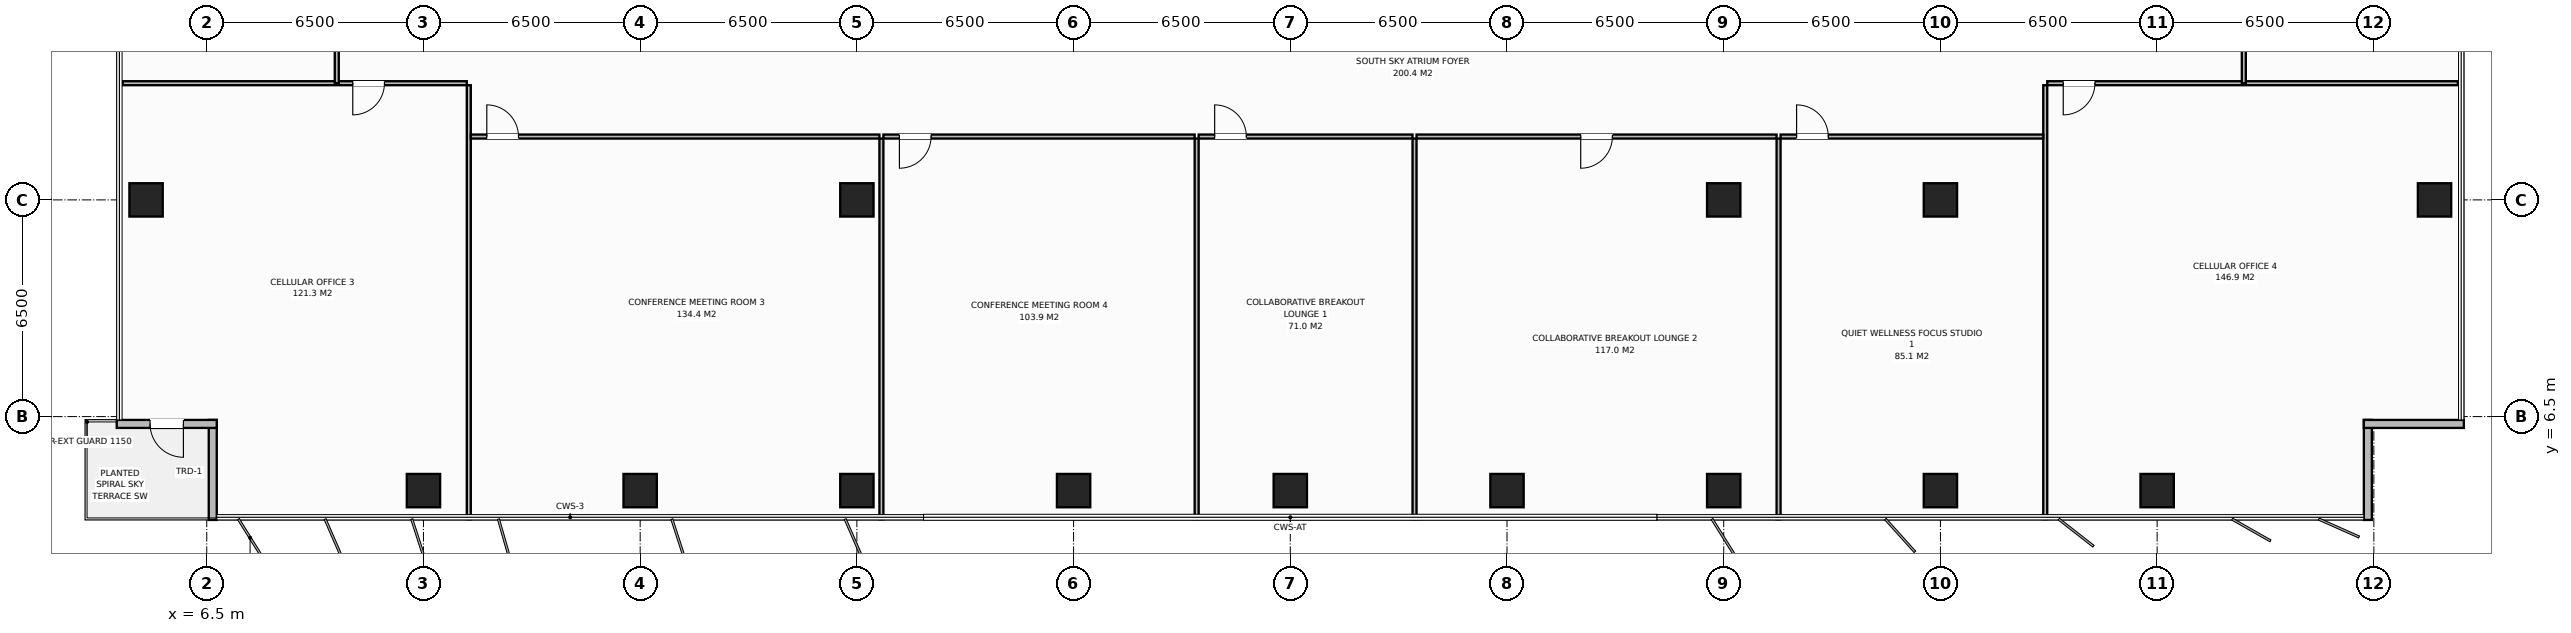
"""IFC4 building model, lengths in metres.
Left out: names, types, materials, properties, quantities, classifications, styles, units other than length and angle.
Written with IfcOpenShell. Run it as: python <this file> out.ifc"""

import sys

from ifc_helpers import new_model, si_unit, direction, frame, frame_2d, origin, origin_2d, place, context, subcontext, project, spatial, rectangle, extrude, element, fill, save


model = new_model("IFC4")
c1 = context("Model", 3, precision=1e-05, world=origin(), true_north=direction((0.0, 1.0)))
c2 = subcontext(c1, "Body", "Model", "MODEL_VIEW")
j1 = project(units=[si_unit("LENGTHUNIT", "METRE"), si_unit("PLANEANGLEUNIT", "RADIAN")], contexts=[c1])
p1 = place(None, origin())
s1 = spatial("IfcSite", under=j1, at=p1, CompositionType="ELEMENT")
p2 = place(p1, origin())
s2 = spatial("IfcBuilding", under=s1, at=p2, CompositionType="ELEMENT")
p3 = place(p2, frame((0.0, 0.0, 163.2)))
s3 = spatial("IfcBuildingStorey", under=s2, at=p3, CompositionType="ELEMENT", Elevation=163.2)
for number, where, z_axis, x_axis in (
    (1, (58.5, 13.0, 0.0), (0.0, 0.0, 1.0), (1.0, 0.0, 0.0)),
    (2, (26.0, 13.0, 0.0), (0.0, 0.0, 1.0), (1.0, 0.0, 0.0)),
    (3, (52.0, 13.0, 0.0), (0.0, 0.0, 1.0), (1.0, 0.0, 0.0)),
    (4, (13.0, 4.28, 0.0), (0.0, 0.0, 1.0), (1.0, 0.0, 0.0)),
    (5, (19.5, 4.28, 0.0), (0.0, 0.0, 1.0), (1.0, 0.0, 0.0)),
    (6, (26.0, 4.28, 0.0), (0.0, 0.0, 1.0), (1.0, 0.0, 0.0)),
    (7, (32.5, 4.28, 0.0), (0.0, 0.0, 1.0), (1.0, 0.0, 0.0)),
    (8, (39.0, 4.28, 0.0), (0.0, 0.0, 1.0), (1.0, 0.0, 0.0)),
    (9, (45.5, 4.28, 0.0), (0.0, 0.0, 1.0), (1.0, 0.0, 0.0)),
    (10, (52.0, 4.28, 0.0), (0.0, 0.0, 1.0), (1.0, 0.0, 0.0)),
    (11, (58.5, 4.28, 0.0), (0.0, 0.0, 1.0), (1.0, 0.0, 0.0)),
    (12, (65.0, 4.28, 0.0), (0.0, 0.0, 1.0), (1.0, 0.0, 0.0)),
    (13, (4.68, 13.0, 0.0), (0.0, 0.0, 1.0), (1.0, 0.0, 0.0)),
    (14, (73.32, 13.0, 0.0), (0.0, 0.0, 1.0), (1.0, 0.0, 0.0)),
):
    element("IfcColumn", number, at=place(p3, frame(where, z_axis=z_axis, x_axis=x_axis)), inside=s3, PredefinedType="COLUMN", context=c2, shape_type="SweptSolid", body=[
        extrude(rectangle(XDim=1.0, YDim=1.0, at=origin_2d()), origin(), (0.0, 0.0, 1.0), 3.8),
    ])
p4 = place(p3, frame((6.68, 3.4, 0.0), z_axis=(0.0, 0.0, 1.0), x_axis=(0.0, 1.0, 0.0)))
e15 = element("IfcWall", 15, at=p4, inside=s3, PredefinedType="STANDARD", context=c2, shape_type="SweptSolid", body=[
    extrude(rectangle(XDim=3.0, YDim=0.24, at=frame_2d((1.5, 0.0))), origin(), (0.0, 0.0, 1.0), 3.572),
])
p5 = place(p3, frame((6.8, 6.28, 0.0), z_axis=(0.0, 0.0, 1.0), x_axis=(-1.0, 0.0, 0.0)))
e16 = element("IfcWall", 16, at=p5, inside=s3, PredefinedType="STANDARD", context=c2, shape_type="SweptSolid", body=[
    extrude(rectangle(XDim=3.0, YDim=0.24, at=frame_2d((1.5, 0.0))), origin(), (0.0, 0.0, 1.0), 3.572),
])
p6 = place(p5, frame((1.0, 0.0, 0.0)))
e17 = element("IfcOpeningElement", 17, at=p6, cuts=e16, PredefinedType="OPENING", context=c2, shape_type="SweptSolid", body=[
    extrude(rectangle(XDim=1.0, YDim=2.2, at=frame_2d((0.5, 1.1))), frame((0.0, 0.13, 0.0), z_axis=(0.0, -1.0, 0.0), x_axis=(1.0, 0.0, 0.0)), (0.0, 0.0, 1.0), 0.26),
])
for number, where, z_axis, x_axis in (
    (18, (71.32, 6.4, 0.0), (0.0, 0.0, 1.0), (0.0, -1.0, 0.0)),
    (19, (74.2, 6.28, 0.0), (0.0, 0.0, 1.0), (-1.0, 0.0, 0.0)),
):
    element("IfcWall", number, at=place(p3, frame(where, z_axis=z_axis, x_axis=x_axis)), inside=s3, PredefinedType="STANDARD", context=c2, shape_type="SweptSolid", body=[
        extrude(rectangle(XDim=3.0, YDim=0.24, at=frame_2d((1.5, 0.0))), origin(), (0.0, 0.0, 1.0), 3.572),
    ])
p7 = place(p3, frame((14.36, 3.42, 0.0), z_axis=(0.0, 0.0, 1.0), x_axis=(0.0, 1.0, 0.0)))
e20 = element("IfcWall", 20, at=p7, inside=s3, PredefinedType="PARTITIONING", context=c2, shape_type="SweptSolid", body=[
    extrude(rectangle(XDim=13.02, YDim=0.12, at=frame_2d((6.51, 0.0))), origin(), (0.0, 0.0, 1.0), 3.572),
])
p8 = place(p3, frame((3.98, 16.5, 0.0), z_axis=(0.0, 0.0, 1.0), x_axis=(1.0, 0.0, 0.0)))
e21 = element("IfcWall", 21, at=p8, inside=s3, PredefinedType="PARTITIONING", context=c2, shape_type="SweptSolid", body=[
    extrude(rectangle(XDim=10.32, YDim=0.12, at=frame_2d((5.16, 0.0))), origin(), (0.0, 0.0, 1.0), 3.572),
])
p9 = place(p8, frame((6.9, 0.0, 0.0)))
e22 = element("IfcOpeningElement", 22, at=p9, cuts=e21, PredefinedType="OPENING", context=c2, shape_type="SweptSolid", body=[
    extrude(rectangle(XDim=0.95, YDim=2.15, at=frame_2d((0.475, 1.075))), frame((0.0, 0.07, 0.0), z_axis=(0.0, -1.0, 0.0), x_axis=(1.0, 0.0, 0.0)), (0.0, 0.0, 1.0), 0.14),
])
p10 = place(p3, frame((26.736, 3.42, 0.0), z_axis=(0.0, 0.0, 1.0), x_axis=(0.0, 1.0, 0.0)))
e23 = element("IfcWall", 23, at=p10, inside=s3, PredefinedType="PARTITIONING", context=c2, shape_type="SweptSolid", body=[
    extrude(rectangle(XDim=11.42, YDim=0.12, at=frame_2d((5.71, 0.0))), origin(), (0.0, 0.0, 1.0), 3.572),
])
p11 = place(p3, frame((14.42, 14.9, 0.0), z_axis=(0.0, 0.0, 1.0), x_axis=(1.0, 0.0, 0.0)))
e24 = element("IfcWall", 24, at=p11, inside=s3, PredefinedType="PARTITIONING", context=c2, shape_type="SweptSolid", body=[
    extrude(rectangle(XDim=12.256, YDim=0.12, at=frame_2d((6.128, 0.0))), origin(), (0.0, 0.0, 1.0), 3.572),
])
p12 = place(p11, frame((0.48, 0.0, 0.0)))
e25 = element("IfcOpeningElement", 25, at=p12, cuts=e24, PredefinedType="OPENING", context=c2, shape_type="SweptSolid", body=[
    extrude(rectangle(XDim=0.95, YDim=2.15, at=frame_2d((0.475, 1.075))), frame((0.0, 0.07, 0.0), z_axis=(0.0, -1.0, 0.0), x_axis=(1.0, 0.0, 0.0)), (0.0, 0.0, 1.0), 0.14),
])
p13 = place(p3, frame((36.191, 3.42, 0.0), z_axis=(0.0, 0.0, 1.0), x_axis=(0.0, 1.0, 0.0)))
e26 = element("IfcWall", 26, at=p13, inside=s3, PredefinedType="PARTITIONING", context=c2, shape_type="SweptSolid", body=[
    extrude(rectangle(XDim=11.42, YDim=0.12, at=frame_2d((5.71, 0.0))), origin(), (0.0, 0.0, 1.0), 3.572),
])
p14 = place(p3, frame((26.796, 14.9, 0.0), z_axis=(0.0, 0.0, 1.0), x_axis=(1.0, 0.0, 0.0)))
e27 = element("IfcWall", 27, at=p14, inside=s3, PredefinedType="PARTITIONING", context=c2, shape_type="SweptSolid", body=[
    extrude(rectangle(XDim=9.335, YDim=0.12, at=frame_2d((4.668, 0.0))), origin(), (0.0, 0.0, 1.0), 3.572),
])
p15 = place(p14, frame((0.48, 0.0, 0.0)))
e28 = element("IfcOpeningElement", 28, at=p15, cuts=e27, PredefinedType="OPENING", context=c2, shape_type="SweptSolid", body=[
    extrude(rectangle(XDim=0.95, YDim=2.15, at=frame_2d((0.475, 1.075))), frame((0.0, 0.07, 0.0), z_axis=(0.0, -1.0, 0.0), x_axis=(1.0, 0.0, 0.0)), (0.0, 0.0, 1.0), 0.14),
])
p16 = place(p3, frame((42.726, 3.42, 0.0), z_axis=(0.0, 0.0, 1.0), x_axis=(0.0, 1.0, 0.0)))
e29 = element("IfcWall", 29, at=p16, inside=s3, PredefinedType="PARTITIONING", context=c2, shape_type="SweptSolid", body=[
    extrude(rectangle(XDim=11.42, YDim=0.12, at=frame_2d((5.71, 0.0))), origin(), (0.0, 0.0, 1.0), 3.572),
])
p17 = place(p3, frame((36.251, 14.9, 0.0), z_axis=(0.0, 0.0, 1.0), x_axis=(1.0, 0.0, 0.0)))
e30 = element("IfcWall", 30, at=p17, inside=s3, PredefinedType="PARTITIONING", context=c2, shape_type="SweptSolid", body=[
    extrude(rectangle(XDim=6.415, YDim=0.12, at=frame_2d((3.207, 0.0))), origin(), (0.0, 0.0, 1.0), 3.572),
])
p18 = place(p17, frame((0.48, 0.0, 0.0)))
e31 = element("IfcOpeningElement", 31, at=p18, cuts=e30, PredefinedType="OPENING", context=c2, shape_type="SweptSolid", body=[
    extrude(rectangle(XDim=0.95, YDim=2.15, at=frame_2d((0.475, 1.075))), frame((0.0, 0.07, 0.0), z_axis=(0.0, -1.0, 0.0), x_axis=(1.0, 0.0, 0.0)), (0.0, 0.0, 1.0), 0.14),
])
p19 = place(p3, frame((53.646, 3.42, 0.0), z_axis=(0.0, 0.0, 1.0), x_axis=(0.0, 1.0, 0.0)))
e32 = element("IfcWall", 32, at=p19, inside=s3, PredefinedType="PARTITIONING", context=c2, shape_type="SweptSolid", body=[
    extrude(rectangle(XDim=11.42, YDim=0.12, at=frame_2d((5.71, 0.0))), origin(), (0.0, 0.0, 1.0), 3.572),
])
p20 = place(p3, frame((42.786, 14.9, 0.0), z_axis=(0.0, 0.0, 1.0), x_axis=(1.0, 0.0, 0.0)))
e33 = element("IfcWall", 33, at=p20, inside=s3, PredefinedType="PARTITIONING", context=c2, shape_type="SweptSolid", body=[
    extrude(rectangle(XDim=10.799, YDim=0.12, at=frame_2d((5.4, 0.0))), origin(), (0.0, 0.0, 1.0), 3.572),
])
p21 = place(p20, frame((4.925, 0.0, 0.0)))
e34 = element("IfcOpeningElement", 34, at=p21, cuts=e33, PredefinedType="OPENING", context=c2, shape_type="SweptSolid", body=[
    extrude(rectangle(XDim=0.95, YDim=2.15, at=frame_2d((0.475, 1.075))), frame((0.0, 0.07, 0.0), z_axis=(0.0, -1.0, 0.0), x_axis=(1.0, 0.0, 0.0)), (0.0, 0.0, 1.0), 0.14),
])
p22 = place(p3, frame((61.644, 3.42, 0.0), z_axis=(0.0, 0.0, 1.0), x_axis=(0.0, 1.0, 0.0)))
e35 = element("IfcWall", 35, at=p22, inside=s3, PredefinedType="PARTITIONING", context=c2, shape_type="SweptSolid", body=[
    extrude(rectangle(XDim=13.02, YDim=0.12, at=frame_2d((6.51, 0.0))), origin(), (0.0, 0.0, 1.0), 3.572),
])
p23 = place(p3, frame((53.705, 14.9, 0.0), z_axis=(0.0, 0.0, 1.0), x_axis=(1.0, 0.0, 0.0)))
e36 = element("IfcWall", 36, at=p23, inside=s3, PredefinedType="PARTITIONING", context=c2, shape_type="SweptSolid", body=[
    extrude(rectangle(XDim=7.879, YDim=0.12, at=frame_2d((3.939, 0.0))), origin(), (0.0, 0.0, 1.0), 3.572),
])
p24 = place(p23, frame((0.48, 0.0, 0.0)))
e37 = element("IfcOpeningElement", 37, at=p24, cuts=e36, PredefinedType="OPENING", context=c2, shape_type="SweptSolid", body=[
    extrude(rectangle(XDim=0.95, YDim=2.15, at=frame_2d((0.475, 1.075))), frame((0.0, 0.07, 0.0), z_axis=(0.0, -1.0, 0.0), x_axis=(1.0, 0.0, 0.0)), (0.0, 0.0, 1.0), 0.14),
])
p25 = place(p3, frame((61.704, 16.5, 0.0), z_axis=(0.0, 0.0, 1.0), x_axis=(1.0, 0.0, 0.0)))
e38 = element("IfcWall", 38, at=p25, inside=s3, PredefinedType="PARTITIONING", context=c2, shape_type="SweptSolid", body=[
    extrude(rectangle(XDim=12.316, YDim=0.12, at=frame_2d((6.158, 0.0))), origin(), (0.0, 0.0, 1.0), 3.572),
])
p26 = place(p25, frame((0.48, 0.0, 0.0)))
e39 = element("IfcOpeningElement", 39, at=p26, cuts=e38, PredefinedType="OPENING", context=c2, shape_type="SweptSolid", body=[
    extrude(rectangle(XDim=0.95, YDim=2.15, at=frame_2d((0.475, 1.075))), frame((0.0, 0.07, 0.0), z_axis=(0.0, -1.0, 0.0), x_axis=(1.0, 0.0, 0.0)), (0.0, 0.0, 1.0), 0.14),
])
p27 = place(p3, frame((10.4, 16.5, 0.0), z_axis=(0.0, 0.0, 1.0), x_axis=(0.0, 1.0, 0.0)))
e40 = element("IfcWall", 40, at=p27, inside=s3, PredefinedType="PARTITIONING", context=c2, shape_type="SweptSolid", body=[
    extrude(rectangle(XDim=19.0, YDim=0.12, at=frame_2d((9.5, 0.0))), origin(), (0.0, 0.0, 1.0), 3.572),
])
p28 = place(p27, frame((9.025, 0.0, 0.0)))
e41 = element("IfcOpeningElement", 41, at=p28, cuts=e40, PredefinedType="OPENING", context=c2, shape_type="SweptSolid", body=[
    extrude(rectangle(XDim=0.95, YDim=2.15, at=frame_2d((0.475, 1.075))), frame((0.0, 0.07, 0.0), z_axis=(0.0, -1.0, 0.0), x_axis=(1.0, 0.0, 0.0)), (0.0, 0.0, 1.0), 0.14),
])
p29 = place(p3, frame((67.6, 16.5, 0.0), z_axis=(0.0, 0.0, 1.0), x_axis=(0.0, 1.0, 0.0)))
e42 = element("IfcWall", 42, at=p29, inside=s3, PredefinedType="PARTITIONING", context=c2, shape_type="SweptSolid", body=[
    extrude(rectangle(XDim=9.5, YDim=0.12, at=frame_2d((4.75, 0.0))), origin(), (0.0, 0.0, 1.0), 3.572),
])
p30 = place(p29, frame((5.325, 0.0, 0.0)))
e43 = element("IfcOpeningElement", 43, at=p30, cuts=e42, PredefinedType="OPENING", context=c2, shape_type="SweptSolid", body=[
    extrude(rectangle(XDim=0.95, YDim=2.15, at=frame_2d((0.475, 1.075))), frame((0.0, 0.07, 0.0), z_axis=(0.0, -1.0, 0.0), x_axis=(1.0, 0.0, 0.0)), (0.0, 0.0, 1.0), 0.14),
])
p31 = place(p6, origin())
e44 = element("IfcDoor", 44, at=p31, inside=s3, OperationType="SINGLE_SWING_LEFT", PredefinedType="DOOR", context=c2, shape_type="SweptSolid", body=[
    extrude(rectangle(XDim=1.0, YDim=2.2, at=frame_2d((0.5, 1.1))), frame((0.0, 0.025, 0.0), z_axis=(0.0, -1.0, 0.0), x_axis=(1.0, 0.0, 0.0)), (0.0, 0.0, 1.0), 0.05),
])
fill(e17, e44)
p32 = place(p9, origin())
e45 = element("IfcDoor", 45, at=p32, inside=s3, OperationType="SINGLE_SWING_RIGHT", PredefinedType="DOOR", context=c2, shape_type="SweptSolid", body=[
    extrude(rectangle(XDim=0.95, YDim=2.15, at=frame_2d((0.475, 1.075))), frame((0.0, 0.025, 0.0), z_axis=(0.0, -1.0, 0.0), x_axis=(1.0, 0.0, 0.0)), (0.0, 0.0, 1.0), 0.05),
])
fill(e22, e45)
p33 = place(p12, origin())
e46 = element("IfcDoor", 46, at=p33, inside=s3, OperationType="SINGLE_SWING_LEFT", PredefinedType="DOOR", context=c2, shape_type="SweptSolid", body=[
    extrude(rectangle(XDim=0.95, YDim=2.15, at=frame_2d((0.475, 1.075))), frame((0.0, 0.025, 0.0), z_axis=(0.0, -1.0, 0.0), x_axis=(1.0, 0.0, 0.0)), (0.0, 0.0, 1.0), 0.05),
])
fill(e25, e46)
p34 = place(p15, origin())
e47 = element("IfcDoor", 47, at=p34, inside=s3, OperationType="SINGLE_SWING_RIGHT", PredefinedType="DOOR", context=c2, shape_type="SweptSolid", body=[
    extrude(rectangle(XDim=0.95, YDim=2.15, at=frame_2d((0.475, 1.075))), frame((0.0, 0.025, 0.0), z_axis=(0.0, -1.0, 0.0), x_axis=(1.0, 0.0, 0.0)), (0.0, 0.0, 1.0), 0.05),
])
fill(e28, e47)
p35 = place(p18, origin())
e48 = element("IfcDoor", 48, at=p35, inside=s3, OperationType="SINGLE_SWING_LEFT", PredefinedType="DOOR", context=c2, shape_type="SweptSolid", body=[
    extrude(rectangle(XDim=0.95, YDim=2.15, at=frame_2d((0.475, 1.075))), frame((0.0, 0.025, 0.0), z_axis=(0.0, -1.0, 0.0), x_axis=(1.0, 0.0, 0.0)), (0.0, 0.0, 1.0), 0.05),
])
fill(e31, e48)
p36 = place(p21, origin())
e49 = element("IfcDoor", 49, at=p36, inside=s3, OperationType="SINGLE_SWING_RIGHT", PredefinedType="DOOR", context=c2, shape_type="SweptSolid", body=[
    extrude(rectangle(XDim=0.95, YDim=2.15, at=frame_2d((0.475, 1.075))), frame((0.0, 0.025, 0.0), z_axis=(0.0, -1.0, 0.0), x_axis=(1.0, 0.0, 0.0)), (0.0, 0.0, 1.0), 0.05),
])
fill(e34, e49)
p37 = place(p24, origin())
e50 = element("IfcDoor", 50, at=p37, inside=s3, OperationType="SINGLE_SWING_LEFT", PredefinedType="DOOR", context=c2, shape_type="SweptSolid", body=[
    extrude(rectangle(XDim=0.95, YDim=2.15, at=frame_2d((0.475, 1.075))), frame((0.0, 0.025, 0.0), z_axis=(0.0, -1.0, 0.0), x_axis=(1.0, 0.0, 0.0)), (0.0, 0.0, 1.0), 0.05),
])
fill(e37, e50)
p38 = place(p26, origin())
e51 = element("IfcDoor", 51, at=p38, inside=s3, OperationType="SINGLE_SWING_RIGHT", PredefinedType="DOOR", context=c2, shape_type="SweptSolid", body=[
    extrude(rectangle(XDim=0.95, YDim=2.15, at=frame_2d((0.475, 1.075))), frame((0.0, 0.025, 0.0), z_axis=(0.0, -1.0, 0.0), x_axis=(1.0, 0.0, 0.0)), (0.0, 0.0, 1.0), 0.05),
])
fill(e39, e51)
save(model, sys.argv[1])
